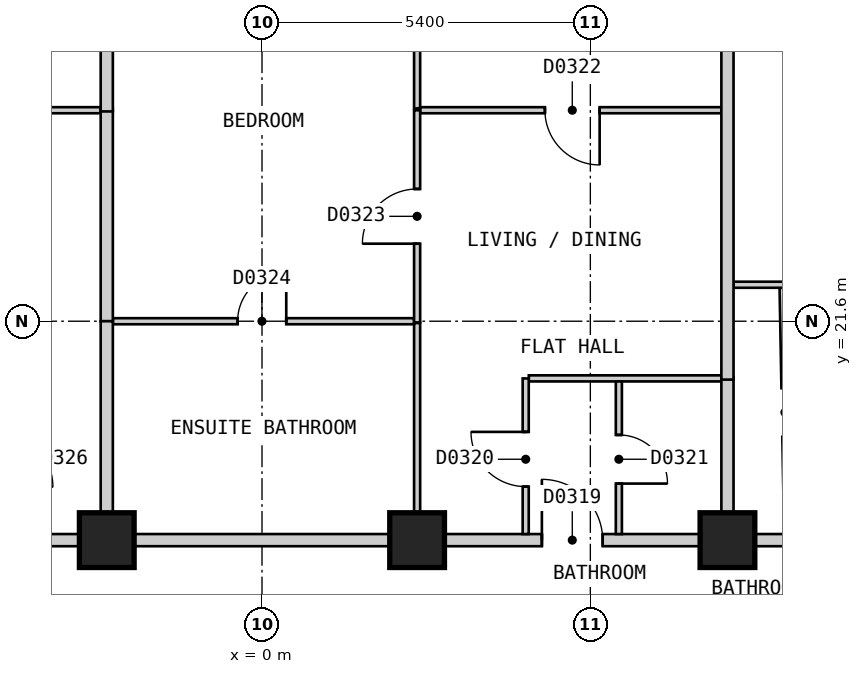
"""IFC4 building model, lengths in metres.
Left out: names, types, materials, properties, quantities, classifications, styles, units other than length and angle.
Written with IfcOpenShell. Run it as: python <this file> out.ifc"""

import sys

from ifc_helpers import new_model, si_unit, direction, frame, frame_2d, origin, origin_2d, place, context, subcontext, project, spatial, rectangle, extrude, element, fill, save


model = new_model("IFC4")
c1 = context("Model", 3, precision=1e-05, world=origin(), true_north=direction((0.0, 1.0)))
c2 = subcontext(c1, "Body", "Model", "MODEL_VIEW")
j1 = project(units=[si_unit("LENGTHUNIT", "METRE"), si_unit("PLANEANGLEUNIT", "RADIAN")], contexts=[c1])
p1 = place(None, origin())
s1 = spatial("IfcSite", under=j1, at=p1, CompositionType="ELEMENT")
p2 = place(p1, origin())
s2 = spatial("IfcBuilding", under=s1, at=p2, CompositionType="ELEMENT")
p3 = place(p2, frame((0.0, 0.0, 59.4)))
s3 = spatial("IfcBuildingStorey", under=s2, at=p3, CompositionType="ELEMENT", Elevation=59.4)
for number, where, z_axis, x_axis in (
    (1, (7.655, 18.0, 0.0), (0.0, 0.0, 1.0), (-1.0, 0.0, 0.0)),
    (2, (2.551, 18.0, 0.0), (0.0, 0.0, 1.0), (-1.0, 0.0, 0.0)),
    (3, (-2.553, 18.0, 0.0), (0.0, 0.0, 1.0), (-1.0, 0.0, 0.0)),
):
    element("IfcColumn", number, at=place(p3, frame(where, z_axis=z_axis, x_axis=x_axis)), inside=s3, PredefinedType="COLUMN", context=c2, shape_type="SweptSolid", body=[
        extrude(rectangle(XDim=0.9, YDim=0.9, at=origin_2d()), origin(), (0.0, 0.0, 1.0), 3.0),
    ])
p4 = place(p3, frame((-10.276, 18.0, 0.0), z_axis=(0.0, 0.0, 1.0), x_axis=(1.0, 0.0, 0.0)))
e4 = element("IfcWall", 4, at=p4, inside=s3, PredefinedType="PARTITIONING", context=c2, shape_type="SweptSolid", body=[
    extrude(rectangle(XDim=20.5, YDim=0.2, at=frame_2d((10.25, 0.0))), origin(), (0.0, 0.0, 1.0), 2.6),
])
p5 = place(p4, frame((19.264, 0.0, 0.0)))
e5 = element("IfcOpeningElement", 5, at=p5, cuts=e4, PredefinedType="OPENING", context=c2, shape_type="SweptSolid", body=[
    extrude(rectangle(XDim=1.0, YDim=2.1, at=frame_2d((0.5, 1.05))), frame((0.0, 0.11, 0.0), z_axis=(0.0, -1.0, 0.0), x_axis=(1.0, 0.0, 0.0)), (0.0, 0.0, 1.0), 0.22),
])
p6 = place(p4, frame((14.879, 0.0, 0.0)))
e6 = element("IfcOpeningElement", 6, at=p6, cuts=e4, PredefinedType="OPENING", context=c2, shape_type="SweptSolid", body=[
    extrude(rectangle(XDim=1.0, YDim=2.1, at=frame_2d((0.5, 1.05))), frame((0.0, 0.11, 0.0), z_axis=(0.0, -1.0, 0.0), x_axis=(1.0, 0.0, 0.0)), (0.0, 0.0, 1.0), 0.22),
])
p7 = place(p4, frame((4.671, 0.0, 0.0)))
e7 = element("IfcOpeningElement", 7, at=p7, cuts=e4, PredefinedType="OPENING", context=c2, shape_type="SweptSolid", body=[
    extrude(rectangle(XDim=1.0, YDim=2.1, at=frame_2d((0.5, 1.05))), frame((0.0, 0.11, 0.0), z_axis=(0.0, -1.0, 0.0), x_axis=(1.0, 0.0, 0.0)), (0.0, 0.0, 1.0), 0.22),
])
p8 = place(p3, frame((8.562, 22.15, 0.0), z_axis=(0.0, 0.0, 1.0), x_axis=(0.018504185939, -0.999828782894, 0.0)))
e8 = element("IfcWall", 8, at=p8, inside=s3, PredefinedType="PARTITIONING", context=c2, shape_type="SweptSolid", body=[
    extrude(rectangle(XDim=4.051, YDim=0.1, at=frame_2d((2.025, 0.0))), origin(), (0.0, 0.0, 1.0), 2.6),
])
p9 = place(p8, frame((1.65, 0.0, 0.0)))
e9 = element("IfcOpeningElement", 9, at=p9, cuts=e8, PredefinedType="OPENING", context=c2, shape_type="SweptSolid", body=[
    extrude(rectangle(XDim=0.8, YDim=2.1, at=frame_2d((0.4, 1.05))), frame((0.0, 0.06, 0.0), z_axis=(0.0, -1.0, 0.0), x_axis=(1.0, 0.0, 0.0)), (0.0, 0.0, 1.0), 0.12),
])
p10 = place(p3, frame((2.551, 28.1, 0.0), z_axis=(0.0, 0.0, 1.0), x_axis=(0.0, -1.0, 0.0)))
e10 = element("IfcWall", 10, at=p10, inside=s3, PredefinedType="PARTITIONING", context=c2, shape_type="SweptSolid", body=[
    extrude(rectangle(XDim=3.0, YDim=0.1, at=frame_2d((1.5, 0.0))), origin(), (0.0, 0.0, 1.0), 2.6),
])
p11 = place(p3, frame((2.551, 21.57, 0.0), z_axis=(0.0, 0.0, 1.0), x_axis=(0.0, -1.0, 0.0)))
e11 = element("IfcWall", 11, at=p11, inside=s3, PredefinedType="PARTITIONING", context=c2, shape_type="SweptSolid", body=[
    extrude(rectangle(XDim=3.47, YDim=0.1, at=frame_2d((1.735, 0.0))), origin(), (0.0, 0.0, 1.0), 2.6),
])
p12 = place(p3, frame((4.388, 20.66, 0.0), z_axis=(0.0, 0.0, 1.0), x_axis=(1.0, 0.0, 0.0)))
e12 = element("IfcWall", 12, at=p12, inside=s3, PredefinedType="PARTITIONING", context=c2, shape_type="SweptSolid", body=[
    extrude(rectangle(XDim=3.167, YDim=0.1, at=frame_2d((1.583, 0.0))), origin(), (0.0, 0.0, 1.0), 2.6),
])
p13 = place(p3, frame((-2.453, 21.6, 0.0), z_axis=(0.0, 0.0, 1.0), x_axis=(1.0, 0.0, 0.0)))
e13 = element("IfcWall", 13, at=p13, inside=s3, PredefinedType="PARTITIONING", context=c2, shape_type="SweptSolid", body=[
    extrude(rectangle(XDim=4.954, YDim=0.1, at=frame_2d((2.477, 0.0))), origin(), (0.0, 0.0, 1.0), 2.6),
])
p14 = place(p13, frame((2.052, 0.0, 0.0)))
e14 = element("IfcOpeningElement", 14, at=p14, cuts=e13, PredefinedType="OPENING", context=c2, shape_type="SweptSolid", body=[
    extrude(rectangle(XDim=0.8, YDim=2.1, at=frame_2d((0.4, 1.05))), frame((0.0, 0.06, 0.0), z_axis=(0.0, -1.0, 0.0), x_axis=(1.0, 0.0, 0.0)), (0.0, 0.0, 1.0), 0.12),
])
p15 = place(p3, frame((7.755, 22.2, 0.0), z_axis=(0.0, 0.0, 1.0), x_axis=(1.0, 0.0, 0.0)))
e15 = element("IfcWall", 15, at=p15, inside=s3, PredefinedType="PARTITIONING", context=c2, shape_type="SweptSolid", body=[
    extrude(rectangle(XDim=4.947, YDim=0.1, at=frame_2d((2.474, 0.0))), origin(), (0.0, 0.0, 1.0), 2.6),
])
p16 = place(p15, frame((1.206, 0.0, 0.0)))
e16 = element("IfcOpeningElement", 16, at=p16, cuts=e15, PredefinedType="OPENING", context=c2, shape_type="SweptSolid", body=[
    extrude(rectangle(XDim=0.9, YDim=2.1, at=frame_2d((0.45, 1.05))), frame((0.0, 0.06, 0.0), z_axis=(0.0, -1.0, 0.0), x_axis=(1.0, 0.0, 0.0)), (0.0, 0.0, 1.0), 0.12),
])
p17 = place(p3, frame((-7.607, 25.07, 0.0), z_axis=(0.0, 0.0, 1.0), x_axis=(1.0, 0.0, 0.0)))
e17 = element("IfcWall", 17, at=p17, inside=s3, PredefinedType="PARTITIONING", context=c2, shape_type="SweptSolid", body=[
    extrude(rectangle(XDim=4.954, YDim=0.1, at=frame_2d((2.477, 0.0))), origin(), (0.0, 0.0, 1.0), 2.6),
])
p18 = place(p17, frame((2.052, 0.0, 0.0)))
e18 = element("IfcOpeningElement", 18, at=p18, cuts=e17, PredefinedType="OPENING", context=c2, shape_type="SweptSolid", body=[
    extrude(rectangle(XDim=0.9, YDim=2.1, at=frame_2d((0.45, 1.05))), frame((0.0, 0.06, 0.0), z_axis=(0.0, -1.0, 0.0), x_axis=(1.0, 0.0, 0.0)), (0.0, 0.0, 1.0), 0.12),
])
p19 = place(p3, frame((2.601, 25.07, 0.0), z_axis=(0.0, 0.0, 1.0), x_axis=(1.0, 0.0, 0.0)))
e19 = element("IfcWall", 19, at=p19, inside=s3, PredefinedType="PARTITIONING", context=c2, shape_type="SweptSolid", body=[
    extrude(rectangle(XDim=4.954, YDim=0.1, at=frame_2d((2.477, 0.0))), origin(), (0.0, 0.0, 1.0), 2.6),
])
p20 = place(p19, frame((2.052, 0.0, 0.0)))
e20 = element("IfcOpeningElement", 20, at=p20, cuts=e19, PredefinedType="OPENING", context=c2, shape_type="SweptSolid", body=[
    extrude(rectangle(XDim=0.9, YDim=2.1, at=frame_2d((0.45, 1.05))), frame((0.0, 0.06, 0.0), z_axis=(0.0, -1.0, 0.0), x_axis=(1.0, 0.0, 0.0)), (0.0, 0.0, 1.0), 0.12),
])
p21 = place(p3, frame((4.337, 18.1, 0.0), z_axis=(0.0, 0.0, 1.0), x_axis=(0.0, 1.0, 0.0)))
e21 = element("IfcWall", 21, at=p21, inside=s3, PredefinedType="PARTITIONING", context=c2, shape_type="SweptSolid", body=[
    extrude(rectangle(XDim=2.559, YDim=0.1, at=frame_2d((1.279, 0.0))), origin(), (0.0, 0.0, 1.0), 2.6),
])
p22 = place(p21, frame((0.78, 0.0, 0.0)))
e22 = element("IfcOpeningElement", 22, at=p22, cuts=e21, PredefinedType="OPENING", context=c2, shape_type="SweptSolid", body=[
    extrude(rectangle(XDim=0.9, YDim=2.1, at=frame_2d((0.45, 1.05))), frame((0.0, 0.06, 0.0), z_axis=(0.0, -1.0, 0.0), x_axis=(1.0, 0.0, 0.0)), (0.0, 0.0, 1.0), 0.12),
])
p23 = place(p3, frame((5.869, 18.1, 0.0), z_axis=(0.0, 0.0, 1.0), x_axis=(0.0, 1.0, 0.0)))
e23 = element("IfcWall", 23, at=p23, inside=s3, PredefinedType="PARTITIONING", context=c2, shape_type="SweptSolid", body=[
    extrude(rectangle(XDim=2.51, YDim=0.1, at=frame_2d((1.255, 0.0))), origin(), (0.0, 0.0, 1.0), 2.6),
])
p24 = place(p23, frame((0.83, 0.0, 0.0)))
e24 = element("IfcOpeningElement", 24, at=p24, cuts=e23, PredefinedType="OPENING", context=c2, shape_type="SweptSolid", body=[
    extrude(rectangle(XDim=0.8, YDim=2.1, at=frame_2d((0.4, 1.05))), frame((0.0, 0.06, 0.0), z_axis=(0.0, -1.0, 0.0), x_axis=(1.0, 0.0, 0.0)), (0.0, 0.0, 1.0), 0.12),
])
p25 = place(p3, frame((2.551, 21.58, 0.0), z_axis=(0.0, 0.0, 1.0), x_axis=(0.0, 1.0, 0.0)))
e25 = element("IfcWall", 25, at=p25, inside=s3, PredefinedType="PARTITIONING", context=c2, shape_type="SweptSolid", body=[
    extrude(rectangle(XDim=3.49, YDim=0.1, at=frame_2d((1.745, 0.0))), origin(), (0.0, 0.0, 1.0), 2.6),
])
p26 = place(p25, frame((1.295, 0.0, 0.0)))
e26 = element("IfcOpeningElement", 26, at=p26, cuts=e25, PredefinedType="OPENING", context=c2, shape_type="SweptSolid", body=[
    extrude(rectangle(XDim=0.9, YDim=2.1, at=frame_2d((0.45, 1.05))), frame((0.0, 0.06, 0.0), z_axis=(0.0, -1.0, 0.0), x_axis=(1.0, 0.0, 0.0)), (0.0, 0.0, 1.0), 0.12),
])
p27 = place(p3, frame((-2.553, 25.09, 0.0), z_axis=(0.0, 0.0, 1.0), x_axis=(0.0, -1.0, 0.0)))
e27 = element("IfcWall", 27, at=p27, inside=s3, PredefinedType="PARTITIONING", context=c2, shape_type="SweptSolid", body=[
    extrude(rectangle(XDim=3.49, YDim=0.2, at=frame_2d((1.745, 0.0))), origin(), (0.0, 0.0, 1.0), 2.6),
])
p28 = place(p3, frame((7.655, 20.68, 0.0), z_axis=(0.0, 0.0, 1.0), x_axis=(0.0, -1.0, 0.0)))
e28 = element("IfcWall", 28, at=p28, inside=s3, PredefinedType="PARTITIONING", context=c2, shape_type="SweptSolid", body=[
    extrude(rectangle(XDim=2.58, YDim=0.2, at=frame_2d((1.29, 0.0))), origin(), (0.0, 0.0, 1.0), 2.6),
])
p29 = place(p3, frame((7.655, 20.64, 0.0), z_axis=(0.0, 0.0, 1.0), x_axis=(0.0, 1.0, 0.0)))
e29 = element("IfcWall", 29, at=p29, inside=s3, PredefinedType="PARTITIONING", context=c2, shape_type="SweptSolid", body=[
    extrude(rectangle(XDim=7.46, YDim=0.2, at=frame_2d((3.73, 0.0))), origin(), (0.0, 0.0, 1.0), 2.6),
])
p30 = place(p3, frame((-2.553, 18.1, 0.0), z_axis=(0.0, 0.0, 1.0), x_axis=(0.0, 1.0, 0.0)))
e30 = element("IfcWall", 30, at=p30, inside=s3, PredefinedType="PARTITIONING", context=c2, shape_type="SweptSolid", body=[
    extrude(rectangle(XDim=3.5, YDim=0.2, at=frame_2d((1.75, 0.0))), origin(), (0.0, 0.0, 1.0), 2.6),
])
p31 = place(p3, frame((-2.553, 25.05, 0.0), z_axis=(0.0, 0.0, 1.0), x_axis=(0.0, 1.0, 0.0)))
e31 = element("IfcWall", 31, at=p31, inside=s3, PredefinedType="PARTITIONING", context=c2, shape_type="SweptSolid", body=[
    extrude(rectangle(XDim=3.05, YDim=0.2, at=frame_2d((1.525, 0.0))), origin(), (0.0, 0.0, 1.0), 2.6),
])
p32 = place(p6, origin())
e32 = element("IfcDoor", 32, at=p32, inside=s3, OperationType="SINGLE_SWING_LEFT", PredefinedType="DOOR", context=c2, shape_type="SweptSolid", body=[
    extrude(rectangle(XDim=1.0, YDim=2.1, at=frame_2d((0.5, 1.05))), frame((0.0, 0.025, 0.0), z_axis=(0.0, -1.0, 0.0), x_axis=(1.0, 0.0, 0.0)), (0.0, 0.0, 1.0), 0.05),
])
fill(e6, e32)
p33 = place(p22, origin())
e33 = element("IfcDoor", 33, at=p33, inside=s3, OperationType="SINGLE_SWING_RIGHT", PredefinedType="DOOR", context=c2, shape_type="SweptSolid", body=[
    extrude(rectangle(XDim=0.9, YDim=2.1, at=frame_2d((0.45, 1.05))), frame((0.0, 0.025, 0.0), z_axis=(0.0, -1.0, 0.0), x_axis=(1.0, 0.0, 0.0)), (0.0, 0.0, 1.0), 0.05),
])
fill(e22, e33)
p34 = place(p24, origin())
e34 = element("IfcDoor", 34, at=p34, inside=s3, OperationType="SINGLE_SWING_LEFT", PredefinedType="DOOR", context=c2, shape_type="SweptSolid", body=[
    extrude(rectangle(XDim=0.8, YDim=2.1, at=frame_2d((0.4, 1.05))), frame((0.0, 0.025, 0.0), z_axis=(0.0, -1.0, 0.0), x_axis=(1.0, 0.0, 0.0)), (0.0, 0.0, 1.0), 0.05),
])
fill(e24, e34)
p35 = place(p20, origin())
e35 = element("IfcDoor", 35, at=p35, inside=s3, OperationType="SINGLE_SWING_RIGHT", PredefinedType="DOOR", context=c2, shape_type="SweptSolid", body=[
    extrude(rectangle(XDim=0.9, YDim=2.1, at=frame_2d((0.45, 1.05))), frame((0.0, 0.025, 0.0), z_axis=(0.0, -1.0, 0.0), x_axis=(1.0, 0.0, 0.0)), (0.0, 0.0, 1.0), 0.05),
])
fill(e20, e35)
p36 = place(p26, origin())
e36 = element("IfcDoor", 36, at=p36, inside=s3, OperationType="SINGLE_SWING_LEFT", PredefinedType="DOOR", context=c2, shape_type="SweptSolid", body=[
    extrude(rectangle(XDim=0.9, YDim=2.1, at=frame_2d((0.45, 1.05))), frame((0.0, 0.025, 0.0), z_axis=(0.0, -1.0, 0.0), x_axis=(1.0, 0.0, 0.0)), (0.0, 0.0, 1.0), 0.05),
])
fill(e26, e36)
p37 = place(p14, origin())
e37 = element("IfcDoor", 37, at=p37, inside=s3, OperationType="SINGLE_SWING_RIGHT", PredefinedType="DOOR", context=c2, shape_type="SweptSolid", body=[
    extrude(rectangle(XDim=0.8, YDim=2.1, at=frame_2d((0.4, 1.05))), frame((0.0, 0.025, 0.0), z_axis=(0.0, -1.0, 0.0), x_axis=(1.0, 0.0, 0.0)), (0.0, 0.0, 1.0), 0.05),
])
fill(e14, e37)
save(model, sys.argv[1])
